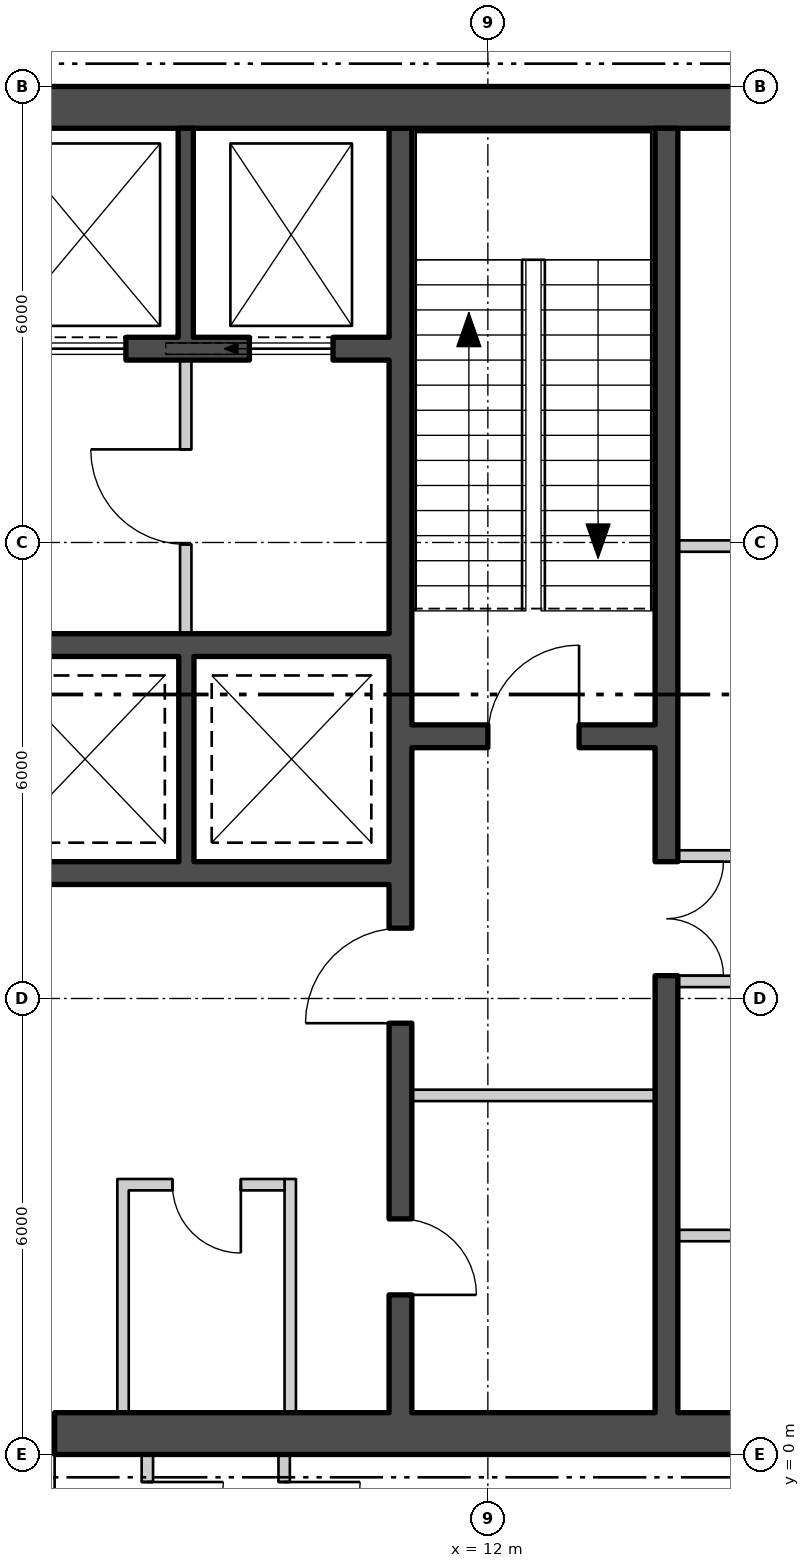
"""IFC4 building model, lengths in metres.
Left out: names, types, materials, properties, quantities, classifications, styles, units other than length and angle.
Written with IfcOpenShell. Run it as: python <this file> out.ifc"""

import sys

from ifc_helpers import new_model, si_unit, direction, frame, frame_2d, origin, place, context, subcontext, project, spatial, polyline, rectangle, outline, extrude, element, fill, save


model = new_model("IFC4")
c1 = context("Model", 3, precision=1e-05, world=origin(), true_north=direction((0.0, 1.0)))
c2 = subcontext(c1, "Body", "Model", "MODEL_VIEW")
j1 = project(units=[si_unit("LENGTHUNIT", "METRE"), si_unit("PLANEANGLEUNIT", "RADIAN")], contexts=[c1])
p1 = place(None, origin())
s1 = spatial("IfcSite", under=j1, at=p1, CompositionType="ELEMENT")
p2 = place(p1, origin())
s2 = spatial("IfcBuilding", under=s1, at=p2, CompositionType="ELEMENT")
p3 = place(p2, frame((0.0, 0.0, 97.8)))
s3 = spatial("IfcBuildingStorey", under=s2, at=p3, CompositionType="ELEMENT", Elevation=97.8)
p4 = place(p3, frame((4.905, -28.133, -0.18), z_axis=(0.0, 0.0, 1.0), x_axis=(0.500000711659, 0.866024992908, 0.0)))
e1 = element("IfcWall", 1, at=p4, inside=s3, PredefinedType="SOLIDWALL", context=c2, shape_type="SweptSolid", body=[
    extrude(outline(polyline([(-0.13, -0.225), (45.87, -0.225), (45.61, 0.225), (0.13, 0.225), (-0.13, -0.225)])), origin(), (0.0, 0.0, 1.0), 4.28),
])
p5 = place(p4, frame((1.424, 0.0, 1.08)))
e2 = element("IfcOpeningElement", 2, at=p5, cuts=e1, PredefinedType="OPENING", context=c2, shape_type="SweptSolid", body=[
    extrude(rectangle(XDim=2.4, YDim=2.6, at=frame_2d((1.2, 1.3))), frame((0.0, 0.235, 0.0), z_axis=(0.0, -1.0, 0.0), x_axis=(1.0, 0.0, 0.0)), (0.0, 0.0, 1.0), 0.47),
])
p6 = place(p4, frame((5.893, 0.0, 1.08)))
e3 = element("IfcOpeningElement", 3, at=p6, cuts=e1, PredefinedType="OPENING", context=c2, shape_type="SweptSolid", body=[
    extrude(rectangle(XDim=2.4, YDim=2.6, at=frame_2d((1.2, 1.3))), frame((0.0, 0.235, 0.0), z_axis=(0.0, -1.0, 0.0), x_axis=(1.0, 0.0, 0.0)), (0.0, 0.0, 1.0), 0.47),
])
p7 = place(p4, frame((10.401, 0.0, 1.08)))
e4 = element("IfcOpeningElement", 4, at=p7, cuts=e1, PredefinedType="OPENING", context=c2, shape_type="SweptSolid", body=[
    extrude(rectangle(XDim=2.4, YDim=2.6, at=frame_2d((1.2, 1.3))), frame((0.0, 0.235, 0.0), z_axis=(0.0, -1.0, 0.0), x_axis=(1.0, 0.0, 0.0)), (0.0, 0.0, 1.0), 0.47),
])
p8 = place(p4, frame((14.909, 0.0, 1.08)))
e5 = element("IfcOpeningElement", 5, at=p8, cuts=e1, PredefinedType="OPENING", context=c2, shape_type="SweptSolid", body=[
    extrude(rectangle(XDim=2.4, YDim=2.6, at=frame_2d((1.2, 1.3))), frame((0.0, 0.235, 0.0), z_axis=(0.0, -1.0, 0.0), x_axis=(1.0, 0.0, 0.0)), (0.0, 0.0, 1.0), 0.47),
])
p9 = place(p4, frame((19.416, 0.0, 1.08)))
e6 = element("IfcOpeningElement", 6, at=p9, cuts=e1, PredefinedType="OPENING", context=c2, shape_type="SweptSolid", body=[
    extrude(rectangle(XDim=2.4, YDim=2.6, at=frame_2d((1.2, 1.3))), frame((0.0, 0.235, 0.0), z_axis=(0.0, -1.0, 0.0), x_axis=(1.0, 0.0, 0.0)), (0.0, 0.0, 1.0), 0.47),
])
p10 = place(p4, frame((28.431, 0.0, 1.08)))
e7 = element("IfcOpeningElement", 7, at=p10, cuts=e1, PredefinedType="OPENING", context=c2, shape_type="SweptSolid", body=[
    extrude(rectangle(XDim=2.4, YDim=2.6, at=frame_2d((1.2, 1.3))), frame((0.0, 0.235, 0.0), z_axis=(0.0, -1.0, 0.0), x_axis=(1.0, 0.0, 0.0)), (0.0, 0.0, 1.0), 0.47),
])
p11 = place(p4, frame((32.939, 0.0, 1.08)))
e8 = element("IfcOpeningElement", 8, at=p11, cuts=e1, PredefinedType="OPENING", context=c2, shape_type="SweptSolid", body=[
    extrude(rectangle(XDim=2.4, YDim=2.6, at=frame_2d((1.2, 1.3))), frame((0.0, 0.235, 0.0), z_axis=(0.0, -1.0, 0.0), x_axis=(1.0, 0.0, 0.0)), (0.0, 0.0, 1.0), 0.47),
])
p12 = place(p4, frame((37.447, 0.0, 1.08)))
e9 = element("IfcOpeningElement", 9, at=p12, cuts=e1, PredefinedType="OPENING", context=c2, shape_type="SweptSolid", body=[
    extrude(rectangle(XDim=2.4, YDim=2.6, at=frame_2d((1.2, 1.3))), frame((0.0, 0.235, 0.0), z_axis=(0.0, -1.0, 0.0), x_axis=(1.0, 0.0, 0.0)), (0.0, 0.0, 1.0), 0.47),
])
p13 = place(p4, frame((41.916, 0.0, 1.08)))
e10 = element("IfcOpeningElement", 10, at=p13, cuts=e1, PredefinedType="OPENING", context=c2, shape_type="SweptSolid", body=[
    extrude(rectangle(XDim=2.4, YDim=2.6, at=frame_2d((1.2, 1.3))), frame((0.0, 0.235, 0.0), z_axis=(0.0, -1.0, 0.0), x_axis=(1.0, 0.0, 0.0)), (0.0, 0.0, 1.0), 0.47),
])
p14 = place(p3, frame((-17.5, 0.275, 0.0), z_axis=(0.0, 0.0, 1.0), x_axis=(1.0, 0.0, 0.0)))
e11 = element("IfcWall", 11, at=p14, inside=s3, PredefinedType="SHEAR", context=c2, shape_type="SweptSolid", body=[
    extrude(rectangle(XDim=35.0, YDim=0.55, at=frame_2d((17.5, 0.0))), origin(), (0.0, 0.0, 1.0), 4.3),
])
p15 = place(p14, frame((12.0, 0.0, 0.0)))
e12 = element("IfcOpeningElement", 12, at=p15, cuts=e11, PredefinedType="OPENING", context=c2, shape_type="SweptSolid", body=[
    extrude(rectangle(XDim=1.8, YDim=2.4, at=frame_2d((0.9, 1.2))), frame((0.0, 0.285, 0.0), z_axis=(0.0, -1.0, 0.0), x_axis=(1.0, 0.0, 0.0)), (0.0, 0.0, 1.0), 0.57),
])
p16 = place(p14, frame((22.0, 0.0, 0.0)))
e13 = element("IfcOpeningElement", 13, at=p16, cuts=e11, PredefinedType="OPENING", context=c2, shape_type="SweptSolid", body=[
    extrude(rectangle(XDim=1.8, YDim=2.4, at=frame_2d((0.9, 1.2))), frame((0.0, 0.285, 0.0), z_axis=(0.0, -1.0, 0.0), x_axis=(1.0, 0.0, 0.0)), (0.0, 0.0, 1.0), 0.57),
])
p17 = place(p3, frame((-17.5, 17.725, 0.0), z_axis=(0.0, 0.0, 1.0), x_axis=(1.0, 0.0, 0.0)))
e14 = element("IfcWall", 14, at=p17, inside=s3, PredefinedType="SHEAR", context=c2, shape_type="SweptSolid", body=[
    extrude(rectangle(XDim=35.0, YDim=0.55, at=frame_2d((17.5, 0.0))), origin(), (0.0, 0.0, 1.0), 4.3),
])
p18 = place(p3, frame((10.85, 0.55, 0.0), z_axis=(0.0, 0.0, 1.0), x_axis=(0.0, 1.0, 0.0)))
e15 = element("IfcWall", 15, at=p18, inside=s3, PredefinedType="SHEAR", context=c2, shape_type="SweptSolid", body=[
    extrude(rectangle(XDim=16.9, YDim=0.3, at=frame_2d((8.45, 0.0))), origin(), (0.0, 0.0, 1.0), 4.3),
])
p19 = place(p18, frame((5.125, 0.0, 0.0)))
e16 = element("IfcOpeningElement", 16, at=p19, cuts=e15, PredefinedType="OPENING", context=c2, shape_type="SweptSolid", body=[
    extrude(rectangle(XDim=1.25, YDim=2.1, at=frame_2d((0.625, 1.05))), frame((0.0, 0.16, 0.0), z_axis=(0.0, -1.0, 0.0), x_axis=(1.0, 0.0, 0.0)), (0.0, 0.0, 1.0), 0.32),
])
p20 = place(p18, frame((1.55, 0.0, 0.0)))
e17 = element("IfcOpeningElement", 17, at=p20, cuts=e15, PredefinedType="OPENING", context=c2, shape_type="SweptSolid", body=[
    extrude(rectangle(XDim=1.0, YDim=2.1, at=frame_2d((0.5, 1.05))), frame((0.0, 0.16, 0.0), z_axis=(0.0, -1.0, 0.0), x_axis=(1.0, 0.0, 0.0)), (0.0, 0.0, 1.0), 0.32),
])
p21 = place(p3, frame((14.35, 0.55, 0.0), z_axis=(0.0, 0.0, 1.0), x_axis=(0.0, 1.0, 0.0)))
e18 = element("IfcWall", 18, at=p21, inside=s3, PredefinedType="SHEAR", context=c2, shape_type="SweptSolid", body=[
    extrude(rectangle(XDim=16.9, YDim=0.3, at=frame_2d((8.45, 0.0))), origin(), (0.0, 0.0, 1.0), 4.3),
])
p22 = place(p21, frame((5.75, 0.0, 0.0)))
e19 = element("IfcOpeningElement", 19, at=p22, cuts=e18, PredefinedType="OPENING", context=c2, shape_type="SweptSolid", body=[
    extrude(rectangle(XDim=1.5, YDim=2.1, at=frame_2d((0.75, 1.05))), frame((0.0, 0.16, 0.0), z_axis=(0.0, -1.0, 0.0), x_axis=(1.0, 0.0, 0.0)), (0.0, 0.0, 1.0), 0.32),
])
p23 = place(p3, frame((11.0, 9.45, 0.0), z_axis=(0.0, 0.0, 1.0), x_axis=(1.0, 0.0, 0.0)))
e20 = element("IfcWall", 20, at=p23, inside=s3, PredefinedType="SHEAR", context=c2, shape_type="SweptSolid", body=[
    extrude(rectangle(XDim=3.2, YDim=0.3, at=frame_2d((1.6, 0.0))), origin(), (0.0, 0.0, 1.0), 4.3),
])
p24 = place(p23, frame((1.0, 0.0, 0.0)))
e21 = element("IfcOpeningElement", 21, at=p24, cuts=e20, PredefinedType="OPENING", context=c2, shape_type="SweptSolid", body=[
    extrude(rectangle(XDim=1.2, YDim=2.1, at=frame_2d((0.6, 1.05))), frame((0.0, 0.16, 0.0), z_axis=(0.0, -1.0, 0.0), x_axis=(1.0, 0.0, 0.0)), (0.0, 0.0, 1.0), 0.32),
])
p25 = place(p3, frame((-10.7, 14.55, 0.0), z_axis=(0.0, 0.0, 1.0), x_axis=(1.0, 0.0, 0.0)))
e22 = element("IfcWall", 22, at=p25, inside=s3, PredefinedType="SHEAR", context=c2, shape_type="SweptSolid", body=[
    extrude(rectangle(XDim=21.4, YDim=0.3, at=frame_2d((10.7, 0.0))), origin(), (0.0, 0.0, 1.0), 4.3),
])
p26 = place(p25, frame((0.738, 0.0, 0.0)))
e23 = element("IfcOpeningElement", 23, at=p26, cuts=e22, PredefinedType="OPENING", context=c2, shape_type="SweptSolid", body=[
    extrude(rectangle(XDim=1.1, YDim=2.1, at=frame_2d((0.55, 1.05))), frame((0.0, 0.16, 0.0), z_axis=(0.0, -1.0, 0.0), x_axis=(1.0, 0.0, 0.0)), (0.0, 0.0, 1.0), 0.32),
])
p27 = place(p25, frame((3.462, 0.0, 0.0)))
e24 = element("IfcOpeningElement", 24, at=p27, cuts=e22, PredefinedType="OPENING", context=c2, shape_type="SweptSolid", body=[
    extrude(rectangle(XDim=1.1, YDim=2.1, at=frame_2d((0.55, 1.05))), frame((0.0, 0.16, 0.0), z_axis=(0.0, -1.0, 0.0), x_axis=(1.0, 0.0, 0.0)), (0.0, 0.0, 1.0), 0.32),
])
p28 = place(p25, frame((6.138, 0.0, 0.0)))
e25 = element("IfcOpeningElement", 25, at=p28, cuts=e22, PredefinedType="OPENING", context=c2, shape_type="SweptSolid", body=[
    extrude(rectangle(XDim=1.1, YDim=2.1, at=frame_2d((0.55, 1.05))), frame((0.0, 0.16, 0.0), z_axis=(0.0, -1.0, 0.0), x_axis=(1.0, 0.0, 0.0)), (0.0, 0.0, 1.0), 0.32),
])
p29 = place(p25, frame((8.812, 0.0, 0.0)))
e26 = element("IfcOpeningElement", 26, at=p29, cuts=e22, PredefinedType="OPENING", context=c2, shape_type="SweptSolid", body=[
    extrude(rectangle(XDim=1.1, YDim=2.1, at=frame_2d((0.55, 1.05))), frame((0.0, 0.16, 0.0), z_axis=(0.0, -1.0, 0.0), x_axis=(1.0, 0.0, 0.0)), (0.0, 0.0, 1.0), 0.32),
])
p30 = place(p25, frame((14.162, 0.0, 0.0)))
e27 = element("IfcOpeningElement", 27, at=p30, cuts=e22, PredefinedType="OPENING", context=c2, shape_type="SweptSolid", body=[
    extrude(rectangle(XDim=1.1, YDim=2.1, at=frame_2d((0.55, 1.05))), frame((0.0, 0.16, 0.0), z_axis=(0.0, -1.0, 0.0), x_axis=(1.0, 0.0, 0.0)), (0.0, 0.0, 1.0), 0.32),
])
p31 = place(p25, frame((16.837, 0.0, 0.0)))
e28 = element("IfcOpeningElement", 28, at=p31, cuts=e22, PredefinedType="OPENING", context=c2, shape_type="SweptSolid", body=[
    extrude(rectangle(XDim=1.1, YDim=2.1, at=frame_2d((0.55, 1.05))), frame((0.0, 0.16, 0.0), z_axis=(0.0, -1.0, 0.0), x_axis=(1.0, 0.0, 0.0)), (0.0, 0.0, 1.0), 0.32),
])
p32 = place(p25, frame((19.562, 0.0, 0.0)))
e29 = element("IfcOpeningElement", 29, at=p32, cuts=e22, PredefinedType="OPENING", context=c2, shape_type="SweptSolid", body=[
    extrude(rectangle(XDim=1.1, YDim=2.1, at=frame_2d((0.55, 1.05))), frame((0.0, 0.16, 0.0), z_axis=(0.0, -1.0, 0.0), x_axis=(1.0, 0.0, 0.0)), (0.0, 0.0, 1.0), 0.32),
])
for number, where, z_axis, x_axis in (
    (30, (2.6, 10.65, 0.0), (0.0, 0.0, 1.0), (1.0, 0.0, 0.0)),
    (31, (2.6, 7.65, 0.0), (0.0, 0.0, 1.0), (1.0, 0.0, 0.0)),
):
    element("IfcWall", number, at=place(p3, frame(where, z_axis=z_axis, x_axis=x_axis)), inside=s3, PredefinedType="SHEAR", context=c2, shape_type="SweptSolid", body=[
        extrude(rectangle(XDim=8.1, YDim=0.3, at=frame_2d((4.05, 0.0))), origin(), (0.0, 0.0, 1.0), 4.3),
    ])
p33 = place(p3, frame((8.025, 14.7, 0.0), z_axis=(0.0, 0.0, 1.0), x_axis=(0.0, 1.0, 0.0)))
e32 = element("IfcWall", 32, at=p33, inside=s3, PredefinedType="SHEAR", context=c2, shape_type="SweptSolid", body=[
    extrude(rectangle(XDim=2.75, YDim=0.2, at=frame_2d((1.375, 0.0))), origin(), (0.0, 0.0, 1.0), 4.3),
])
p34 = place(p3, frame((8.033, 7.8, 0.0), z_axis=(0.0, 0.0, 1.0), x_axis=(0.0, 1.0, 0.0)))
e33 = element("IfcWall", 33, at=p34, inside=s3, PredefinedType="SHEAR", context=c2, shape_type="SweptSolid", body=[
    extrude(rectangle(XDim=2.7, YDim=0.2, at=frame_2d((1.35, 0.0))), origin(), (0.0, 0.0, 1.0), 4.3),
])
p35 = place(p3, frame((8.025, 10.8, 0.0), z_axis=(0.0, 0.0, 1.0), x_axis=(0.0, 1.0, 0.0)))
e34 = element("IfcWall", 34, at=p35, inside=s3, PredefinedType="PARTITIONING", context=c2, shape_type="SweptSolid", body=[
    extrude(rectangle(XDim=3.6, YDim=0.15, at=frame_2d((1.8, 0.0))), origin(), (0.0, 0.0, 1.0), 4.3),
])
p36 = place(p35, frame((1.175, 0.0, 0.0)))
e35 = element("IfcOpeningElement", 35, at=p36, cuts=e34, PredefinedType="OPENING", context=c2, shape_type="SweptSolid", body=[
    extrude(rectangle(XDim=1.25, YDim=2.1, at=frame_2d((0.625, 1.05))), frame((0.0, 0.085, 0.0), z_axis=(0.0, -1.0, 0.0), x_axis=(1.0, 0.0, 0.0)), (0.0, 0.0, 1.0), 0.17),
])
p37 = place(p3, frame((11.0, 4.725, 0.0), z_axis=(0.0, 0.0, 1.0), x_axis=(1.0, 0.0, 0.0)))
e36 = element("IfcWall", 36, at=p37, inside=s3, PredefinedType="PARTITIONING", context=c2, shape_type="SweptSolid", body=[
    extrude(rectangle(XDim=3.2, YDim=0.15, at=frame_2d((1.6, 0.0))), origin(), (0.0, 0.0, 1.0), 4.3),
])
for number, where, z_axis, x_axis in (
    (37, (14.5, 6.225, 0.0), (0.0, 0.0, 1.0), (1.0, 0.0, 0.0)),
    (38, (14.5, 7.875, 0.0), (0.0, 0.0, 1.0), (1.0, 0.0, 0.0)),
    (39, (14.5, 2.881, 0.0), (0.0, 0.0, 1.0), (1.0, 0.0, 0.0)),
    (40, (14.5, 11.953, 0.0), (0.0, 0.0, 1.0), (1.0, 0.0, 0.0)),
):
    element("IfcWall", number, at=place(p3, frame(where, z_axis=z_axis, x_axis=x_axis)), inside=s3, PredefinedType="PARTITIONING", context=c2, shape_type="SweptSolid", body=[
        extrude(rectangle(XDim=2.45, YDim=0.15, at=frame_2d((1.225, 0.0))), origin(), (0.0, 0.0, 1.0), 4.3),
    ])
for number, where, z_axis, x_axis in (
    (41, (7.2, 0.55, 0.0), (0.0, 0.0, 1.0), (0.0, 1.0, 0.0)),
    (42, (9.4, 0.55, 0.0), (0.0, 0.0, 1.0), (0.0, 1.0, 0.0)),
):
    element("IfcWall", number, at=place(p3, frame(where, z_axis=z_axis, x_axis=x_axis)), inside=s3, PredefinedType="PARTITIONING", context=c2, shape_type="SweptSolid", body=[
        extrude(rectangle(XDim=3.075, YDim=0.15, at=frame_2d((1.538, 0.0))), origin(), (0.0, 0.0, 1.0), 4.3),
    ])
p38 = place(p3, frame((7.275, 3.55, 0.0), z_axis=(0.0, 0.0, 1.0), x_axis=(1.0, 0.0, 0.0)))
e43 = element("IfcWall", 43, at=p38, inside=s3, PredefinedType="PARTITIONING", context=c2, shape_type="SweptSolid", body=[
    extrude(rectangle(XDim=2.05, YDim=0.15, at=frame_2d((1.025, 0.0))), origin(), (0.0, 0.0, 1.0), 4.3),
])
p39 = place(p38, frame((0.575, 0.0, 0.0)))
e44 = element("IfcOpeningElement", 44, at=p39, cuts=e43, PredefinedType="OPENING", context=c2, shape_type="SweptSolid", body=[
    extrude(rectangle(XDim=0.9, YDim=2.1, at=frame_2d((0.45, 1.05))), frame((0.0, 0.085, 0.0), z_axis=(0.0, -1.0, 0.0), x_axis=(1.0, 0.0, 0.0)), (0.0, 0.0, 1.0), 0.17),
])
p40 = place(p3, frame((7.52, -1.725, 0.0), z_axis=(0.0, 0.0, 1.0), x_axis=(0.0, 1.0, 0.0)))
e45 = element("IfcWall", 45, at=p40, inside=s3, PredefinedType="PARTITIONING", context=c2, shape_type="SweptSolid", body=[
    extrude(rectangle(XDim=1.725, YDim=0.15, at=frame_2d((0.863, 0.0))), origin(), (0.0, 0.0, 1.0), 4.3),
])
p41 = place(p40, frame((0.363, 0.0, 0.0)))
e46 = element("IfcOpeningElement", 46, at=p41, cuts=e45, PredefinedType="OPENING", context=c2, shape_type="SweptSolid", body=[
    extrude(rectangle(XDim=1.0, YDim=2.1, at=frame_2d((0.5, 1.05))), frame((0.0, 0.085, 0.0), z_axis=(0.0, -1.0, 0.0), x_axis=(1.0, 0.0, 0.0)), (0.0, 0.0, 1.0), 0.17),
])
p42 = place(p3, frame((9.32, -1.725, 0.0), z_axis=(0.0, 0.0, 1.0), x_axis=(0.0, 1.0, 0.0)))
e47 = element("IfcWall", 47, at=p42, inside=s3, PredefinedType="PARTITIONING", context=c2, shape_type="SweptSolid", body=[
    extrude(rectangle(XDim=1.725, YDim=0.15, at=frame_2d((0.863, 0.0))), origin(), (0.0, 0.0, 1.0), 4.3),
])
p43 = place(p42, frame((0.363, 0.0, 0.0)))
e48 = element("IfcOpeningElement", 48, at=p43, cuts=e47, PredefinedType="OPENING", context=c2, shape_type="SweptSolid", body=[
    extrude(rectangle(XDim=1.0, YDim=2.1, at=frame_2d((0.5, 1.05))), frame((0.0, 0.085, 0.0), z_axis=(0.0, -1.0, 0.0), x_axis=(1.0, 0.0, 0.0)), (0.0, 0.0, 1.0), 0.17),
])
p44 = place(p31, origin())
e49 = element("IfcDoor", 49, at=p44, inside=s3, OperationType="SLIDING_TO_LEFT", PredefinedType="DOOR", context=c2, shape_type="SweptSolid", body=[
    extrude(rectangle(XDim=1.1, YDim=2.1, at=frame_2d((0.55, 1.05))), frame((0.0, 0.025, 0.0), z_axis=(0.0, -1.0, 0.0), x_axis=(1.0, 0.0, 0.0)), (0.0, 0.0, 1.0), 0.05),
])
fill(e28, e49)
p45 = place(p32, origin())
e50 = element("IfcDoor", 50, at=p45, inside=s3, OperationType="SLIDING_TO_LEFT", PredefinedType="DOOR", context=c2, shape_type="SweptSolid", body=[
    extrude(rectangle(XDim=1.1, YDim=2.1, at=frame_2d((0.55, 1.05))), frame((0.0, 0.025, 0.0), z_axis=(0.0, -1.0, 0.0), x_axis=(1.0, 0.0, 0.0)), (0.0, 0.0, 1.0), 0.05),
])
fill(e29, e50)
p46 = place(p36, origin())
e51 = element("IfcDoor", 51, at=p46, inside=s3, OperationType="SINGLE_SWING_LEFT", PredefinedType="DOOR", context=c2, shape_type="SweptSolid", body=[
    extrude(rectangle(XDim=1.25, YDim=2.1, at=frame_2d((0.625, 1.05))), frame((0.0, 0.025, 0.0), z_axis=(0.0, -1.0, 0.0), x_axis=(1.0, 0.0, 0.0)), (0.0, 0.0, 1.0), 0.05),
])
fill(e35, e51)
p47 = place(p24, origin())
e52 = element("IfcDoor", 52, at=p47, inside=s3, OperationType="SINGLE_SWING_LEFT", PredefinedType="DOOR", context=c2, shape_type="SweptSolid", body=[
    extrude(rectangle(XDim=1.2, YDim=2.1, at=frame_2d((0.6, 1.05))), frame((0.0, 0.025, 0.0), z_axis=(0.0, -1.0, 0.0), x_axis=(1.0, 0.0, 0.0)), (0.0, 0.0, 1.0), 0.05),
])
fill(e21, e52)
p48 = place(p19, origin())
e53 = element("IfcDoor", 53, at=p48, inside=s3, OperationType="SINGLE_SWING_RIGHT", PredefinedType="DOOR", context=c2, shape_type="SweptSolid", body=[
    extrude(rectangle(XDim=1.25, YDim=2.1, at=frame_2d((0.625, 1.05))), frame((0.0, 0.025, 0.0), z_axis=(0.0, -1.0, 0.0), x_axis=(1.0, 0.0, 0.0)), (0.0, 0.0, 1.0), 0.05),
])
fill(e16, e53)
p49 = place(p20, origin())
e54 = element("IfcDoor", 54, at=p49, inside=s3, OperationType="SINGLE_SWING_LEFT", PredefinedType="DOOR", context=c2, shape_type="SweptSolid", body=[
    extrude(rectangle(XDim=1.0, YDim=2.1, at=frame_2d((0.5, 1.05))), frame((0.0, 0.025, 0.0), z_axis=(0.0, -1.0, 0.0), x_axis=(1.0, 0.0, 0.0)), (0.0, 0.0, 1.0), 0.05),
])
fill(e17, e54)
p50 = place(p22, origin())
e55 = element("IfcDoor", 55, at=p50, inside=s3, OperationType="DOUBLE_DOOR_SINGLE_SWING", PredefinedType="DOOR", context=c2, shape_type="SweptSolid", body=[
    extrude(rectangle(XDim=1.5, YDim=2.1, at=frame_2d((0.75, 1.05))), frame((0.0, 0.025, 0.0), z_axis=(0.0, -1.0, 0.0), x_axis=(1.0, 0.0, 0.0)), (0.0, 0.0, 1.0), 0.05),
])
fill(e19, e55)
p51 = place(p39, origin())
e56 = element("IfcDoor", 56, at=p51, inside=s3, OperationType="SINGLE_SWING_RIGHT", PredefinedType="DOOR", context=c2, shape_type="SweptSolid", body=[
    extrude(rectangle(XDim=0.9, YDim=2.1, at=frame_2d((0.45, 1.05))), frame((0.0, 0.025, 0.0), z_axis=(0.0, -1.0, 0.0), x_axis=(1.0, 0.0, 0.0)), (0.0, 0.0, 1.0), 0.05),
])
fill(e44, e56)
p52 = place(p16, origin())
e57 = element("IfcDoor", 57, at=p52, inside=s3, OperationType="DOUBLE_DOOR_SINGLE_SWING", PredefinedType="DOOR", context=c2, shape_type="SweptSolid", body=[
    extrude(rectangle(XDim=1.8, YDim=2.4, at=frame_2d((0.9, 1.2))), frame((0.0, 0.025, 0.0), z_axis=(0.0, -1.0, 0.0), x_axis=(1.0, 0.0, 0.0)), (0.0, 0.0, 1.0), 0.05),
])
fill(e13, e57)
p53 = place(p41, origin())
e58 = element("IfcDoor", 58, at=p53, inside=s3, OperationType="SINGLE_SWING_RIGHT", PredefinedType="DOOR", context=c2, shape_type="SweptSolid", body=[
    extrude(rectangle(XDim=1.0, YDim=2.1, at=frame_2d((0.5, 1.05))), frame((0.0, 0.025, 0.0), z_axis=(0.0, -1.0, 0.0), x_axis=(1.0, 0.0, 0.0)), (0.0, 0.0, 1.0), 0.05),
])
fill(e46, e58)
p54 = place(p43, origin())
e59 = element("IfcDoor", 59, at=p54, inside=s3, OperationType="SINGLE_SWING_RIGHT", PredefinedType="DOOR", context=c2, shape_type="SweptSolid", body=[
    extrude(rectangle(XDim=1.0, YDim=2.1, at=frame_2d((0.5, 1.05))), frame((0.0, 0.025, 0.0), z_axis=(0.0, -1.0, 0.0), x_axis=(1.0, 0.0, 0.0)), (0.0, 0.0, 1.0), 0.05),
])
fill(e48, e59)
save(model, sys.argv[1])
